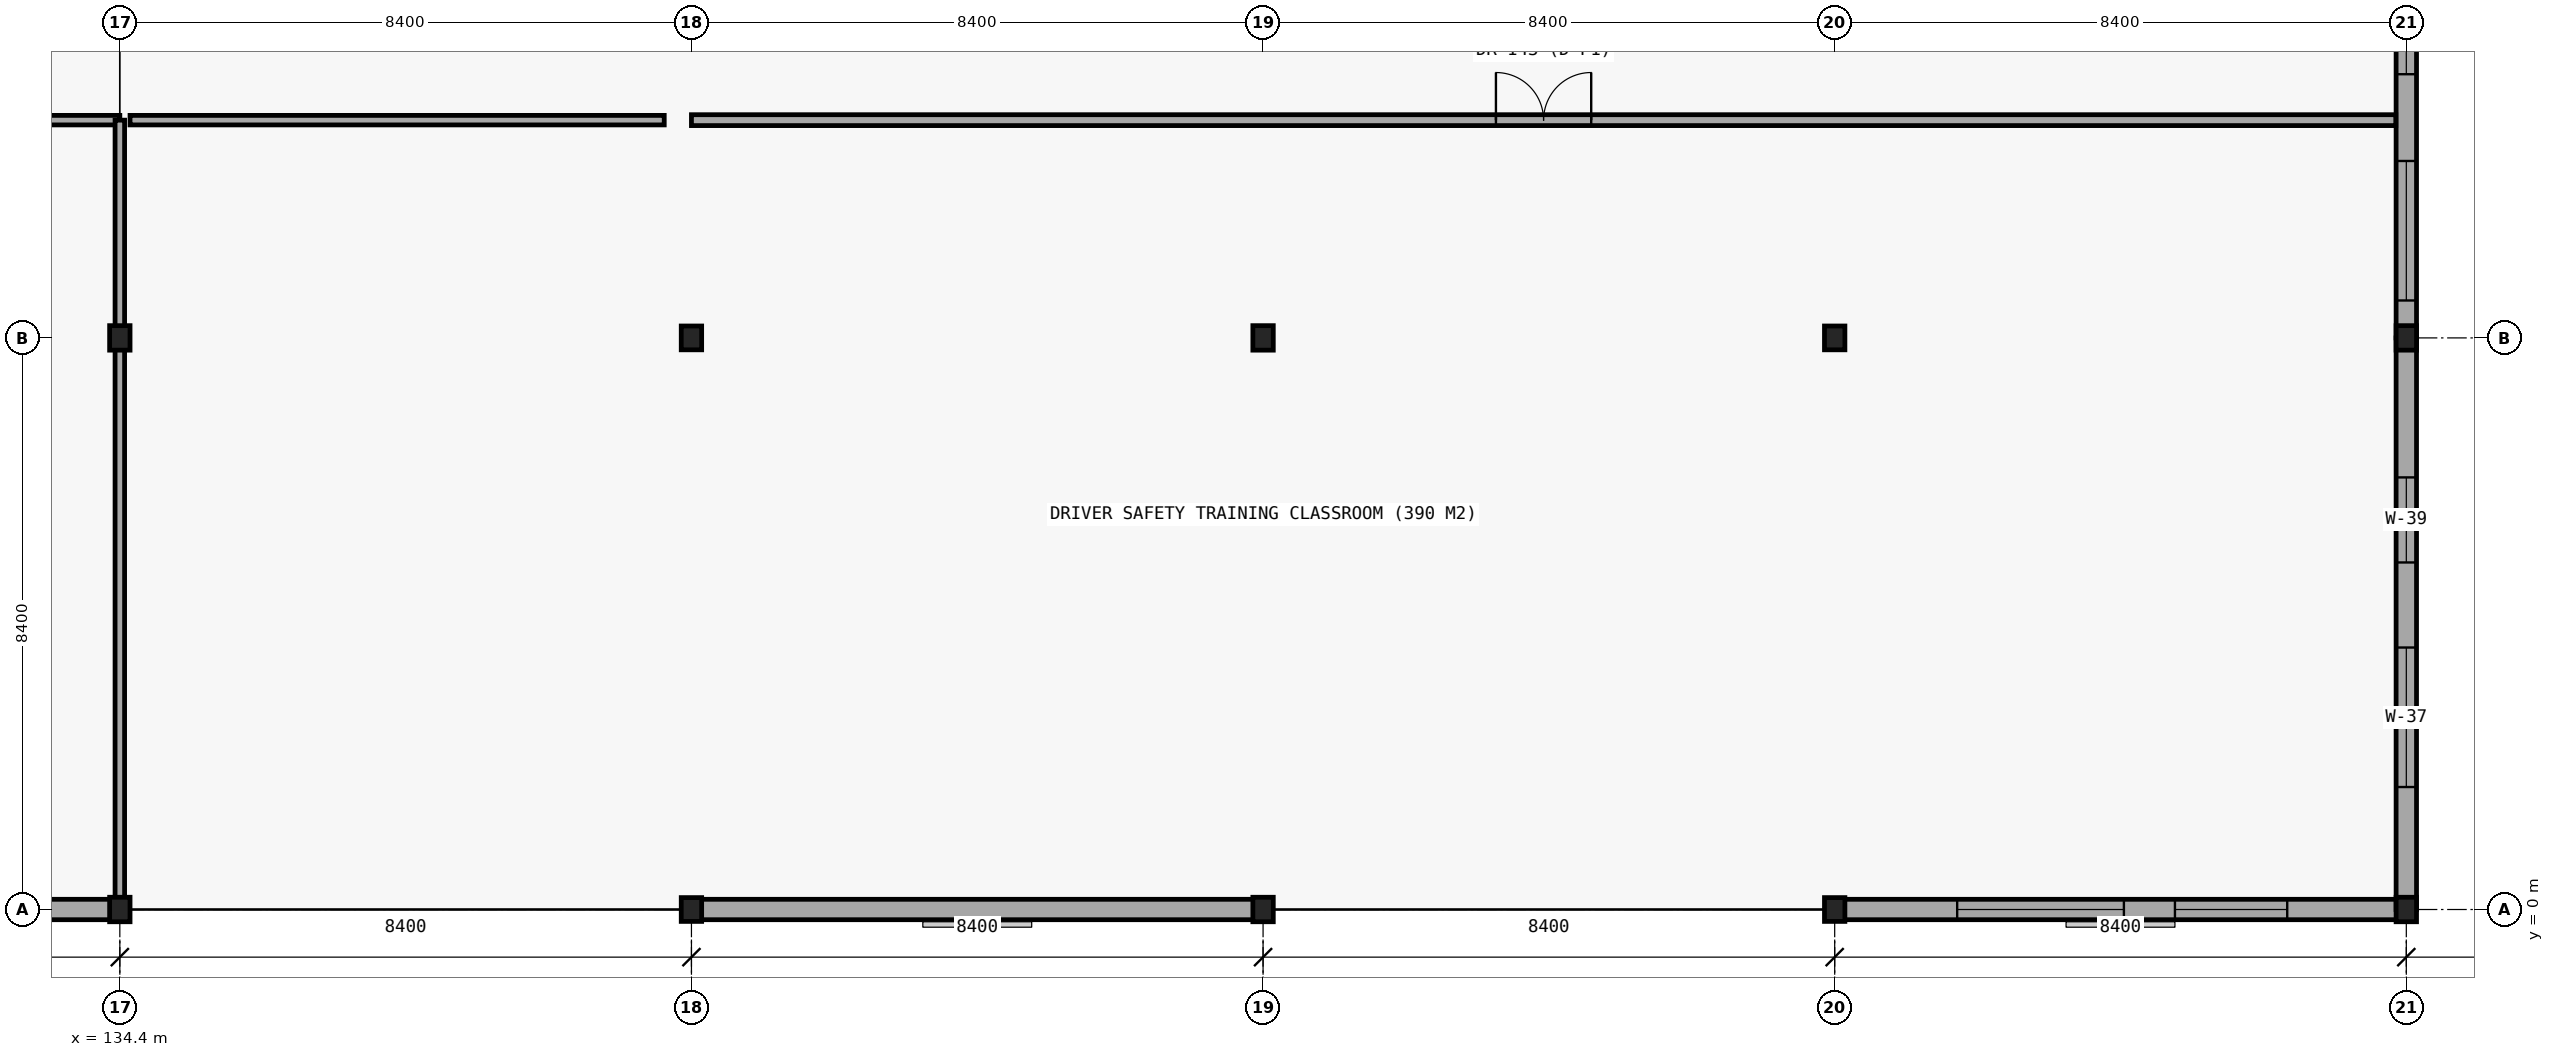
"""IFC4 building model, lengths in metres.
Left out: names, types, materials, properties, quantities, classifications, styles, units other than length and angle.
Written with IfcOpenShell. Run it as: python <this file> out.ifc"""

import sys

from ifc_helpers import new_model, si_unit, direction, frame, frame_2d, origin, origin_2d, place, context, subcontext, project, spatial, rectangle, i_section, extrude, element, fill, save


model = new_model("IFC4")
c1 = context("Model", 3, precision=1e-05, world=origin(), true_north=direction((0.0, 1.0)))
c2 = subcontext(c1, "Body", "Model", "MODEL_VIEW")
j1 = project(units=[si_unit("LENGTHUNIT", "METRE"), si_unit("PLANEANGLEUNIT", "RADIAN")], contexts=[c1])
p1 = place(None, origin())
s1 = spatial("IfcSite", under=j1, at=p1, CompositionType="ELEMENT")
p2 = place(p1, origin())
s2 = spatial("IfcBuilding", under=s1, at=p2, CompositionType="ELEMENT")
p3 = place(p2, frame((0.0, 0.0, 4.8)))
s3 = spatial("IfcBuildingStorey", under=s2, at=p3, CompositionType="ELEMENT", Elevation=4.8)
for number, where, z_axis, x_axis in (
    (1, (134.4, 0.0, 0.0), (0.0, 0.0, 1.0), (1.0, 0.0, 0.0)),
    (2, (134.4, 8.4, 0.0), (0.0, 0.0, 1.0), (1.0, 0.0, 0.0)),
):
    element("IfcColumn", number, at=place(p3, frame(where, z_axis=z_axis, x_axis=x_axis)), inside=s3, PredefinedType="COLUMN", context=c2, shape_type="SweptSolid", body=[
        extrude(i_section(OverallWidth=0.3, OverallDepth=0.36, WebThickness=0.012, FlangeThickness=0.022, FilletRadius=0.027, at=origin_2d()), origin(), (0.0, 0.0, 1.0), 4.2),
    ])
for number, where, z_axis, x_axis in (
    (3, (142.8, 0.0, 0.0), (0.0, 0.0, 1.0), (1.0, 0.0, 0.0)),
    (4, (142.8, 8.4, 0.0), (0.0, 0.0, 1.0), (1.0, 0.0, 0.0)),
):
    element("IfcColumn", number, at=place(p3, frame(where, z_axis=z_axis, x_axis=x_axis)), inside=s3, PredefinedType="COLUMN", context=c2, shape_type="SweptSolid", body=[
        extrude(i_section(OverallWidth=0.3, OverallDepth=0.35, WebThickness=0.01, FlangeThickness=0.018, FilletRadius=0.027, at=origin_2d()), origin(), (0.0, 0.0, 1.0), 4.2),
    ])
for number, where, z_axis, x_axis in (
    (5, (151.2, 0.0, 0.0), (0.0, 0.0, 1.0), (1.0, 0.0, 0.0)),
    (6, (151.2, 8.4, 0.0), (0.0, 0.0, 1.0), (1.0, 0.0, 0.0)),
):
    element("IfcColumn", number, at=place(p3, frame(where, z_axis=z_axis, x_axis=x_axis)), inside=s3, PredefinedType="COLUMN", context=c2, shape_type="SweptSolid", body=[
        extrude(i_section(OverallWidth=0.3, OverallDepth=0.36, WebThickness=0.012, FlangeThickness=0.022, FilletRadius=0.027, at=origin_2d()), origin(), (0.0, 0.0, 1.0), 4.2),
    ])
for number, where, z_axis, x_axis in (
    (7, (159.6, 0.0, 0.0), (0.0, 0.0, 1.0), (1.0, 0.0, 0.0)),
    (8, (159.6, 8.4, 0.0), (0.0, 0.0, 1.0), (1.0, 0.0, 0.0)),
):
    element("IfcColumn", number, at=place(p3, frame(where, z_axis=z_axis, x_axis=x_axis)), inside=s3, PredefinedType="COLUMN", context=c2, shape_type="SweptSolid", body=[
        extrude(i_section(OverallWidth=0.3, OverallDepth=0.35, WebThickness=0.01, FlangeThickness=0.018, FilletRadius=0.027, at=origin_2d()), origin(), (0.0, 0.0, 1.0), 4.2),
    ])
for number, where, z_axis, x_axis in (
    (9, (168.0, 0.0, 0.0), (0.0, 0.0, 1.0), (1.0, 0.0, 0.0)),
    (10, (168.0, 8.4, 0.0), (0.0, 0.0, 1.0), (1.0, 0.0, 0.0)),
):
    element("IfcColumn", number, at=place(p3, frame(where, z_axis=z_axis, x_axis=x_axis)), inside=s3, PredefinedType="COLUMN", context=c2, shape_type="SweptSolid", body=[
        extrude(i_section(OverallWidth=0.3, OverallDepth=0.36, WebThickness=0.012, FlangeThickness=0.022, FilletRadius=0.027, at=origin_2d()), origin(), (0.0, 0.0, 1.0), 4.2),
    ])
p4 = place(p3, frame((126.0, 0.0, 0.0), z_axis=(0.0, 0.0, 1.0), x_axis=(1.0, 0.0, 0.0)))
e11 = element("IfcWall", 11, at=p4, inside=s3, PredefinedType="STANDARD", context=c2, shape_type="SweptSolid", body=[
    extrude(rectangle(XDim=8.4, YDim=0.3, at=frame_2d((4.2, 0.0))), origin(), (0.0, 0.0, 1.0), 3.58),
])
p5 = place(p4, frame((1.8, 0.0, 1.05)))
e12 = element("IfcOpeningElement", 12, at=p5, cuts=e11, PredefinedType="OPENING", context=c2, shape_type="SweptSolid", body=[
    extrude(rectangle(XDim=2.45, YDim=1.85, at=frame_2d((1.225, 0.925))), frame((0.0, 0.16, 0.0), z_axis=(0.0, -1.0, 0.0), x_axis=(1.0, 0.0, 0.0)), (0.0, 0.0, 1.0), 0.32),
])
p6 = place(p4, frame((5.0, 0.0, 1.15)))
e13 = element("IfcOpeningElement", 13, at=p6, cuts=e11, PredefinedType="OPENING", context=c2, shape_type="SweptSolid", body=[
    extrude(rectangle(XDim=1.65, YDim=1.65, at=frame_2d((0.825, 0.825))), frame((0.0, 0.16, 0.0), z_axis=(0.0, -1.0, 0.0), x_axis=(1.0, 0.0, 0.0)), (0.0, 0.0, 1.0), 0.32),
])
p7 = place(p3, frame((142.8, 0.0, 0.0), z_axis=(0.0, 0.0, 1.0), x_axis=(1.0, 0.0, 0.0)))
e14 = element("IfcWall", 14, at=p7, inside=s3, PredefinedType="STANDARD", context=c2, shape_type="SweptSolid", body=[
    extrude(rectangle(XDim=8.4, YDim=0.3, at=frame_2d((4.2, 0.0))), origin(), (0.0, 0.0, 1.0), 3.58),
])
p8 = place(p3, frame((159.6, 0.0, 0.0), z_axis=(0.0, 0.0, 1.0), x_axis=(1.0, 0.0, 0.0)))
e15 = element("IfcWall", 15, at=p8, inside=s3, PredefinedType="STANDARD", context=c2, shape_type="SweptSolid", body=[
    extrude(rectangle(XDim=8.4, YDim=0.3, at=frame_2d((4.2, 0.0))), origin(), (0.0, 0.0, 1.0), 3.58),
])
p9 = place(p8, frame((1.8, 0.0, 1.05)))
e16 = element("IfcOpeningElement", 16, at=p9, cuts=e15, PredefinedType="OPENING", context=c2, shape_type="SweptSolid", body=[
    extrude(rectangle(XDim=2.45, YDim=1.85, at=frame_2d((1.225, 0.925))), frame((0.0, 0.16, 0.0), z_axis=(0.0, -1.0, 0.0), x_axis=(1.0, 0.0, 0.0)), (0.0, 0.0, 1.0), 0.32),
])
p10 = place(p8, frame((5.0, 0.0, 1.15)))
e17 = element("IfcOpeningElement", 17, at=p10, cuts=e15, PredefinedType="OPENING", context=c2, shape_type="SweptSolid", body=[
    extrude(rectangle(XDim=1.65, YDim=1.65, at=frame_2d((0.825, 0.825))), frame((0.0, 0.16, 0.0), z_axis=(0.0, -1.0, 0.0), x_axis=(1.0, 0.0, 0.0)), (0.0, 0.0, 1.0), 0.32),
])
p11 = place(p3, frame((168.0, 0.0, 0.0), z_axis=(0.0, 0.0, 1.0), x_axis=(0.0, 1.0, 0.0)))
e18 = element("IfcWall", 18, at=p11, inside=s3, PredefinedType="STANDARD", context=c2, shape_type="SweptSolid", body=[
    extrude(rectangle(XDim=8.4, YDim=0.3, at=frame_2d((4.2, 0.0))), origin(), (0.0, 0.0, 1.0), 3.58),
])
p12 = place(p11, frame((1.8, 0.0, 1.05)))
e19 = element("IfcOpeningElement", 19, at=p12, cuts=e18, PredefinedType="OPENING", context=c2, shape_type="SweptSolid", body=[
    extrude(rectangle(XDim=2.05, YDim=1.85, at=frame_2d((1.025, 0.925))), frame((0.0, 0.16, 0.0), z_axis=(0.0, -1.0, 0.0), x_axis=(1.0, 0.0, 0.0)), (0.0, 0.0, 1.0), 0.32),
])
p13 = place(p11, frame((5.1, 0.0, 1.2)))
e20 = element("IfcOpeningElement", 20, at=p13, cuts=e18, PredefinedType="OPENING", context=c2, shape_type="SweptSolid", body=[
    extrude(rectangle(XDim=1.25, YDim=1.55, at=frame_2d((0.625, 0.775))), frame((0.0, 0.16, 0.0), z_axis=(0.0, -1.0, 0.0), x_axis=(1.0, 0.0, 0.0)), (0.0, 0.0, 1.0), 0.32),
])
p14 = place(p3, frame((168.0, 8.4, 0.0), z_axis=(0.0, 0.0, 1.0), x_axis=(0.0, 1.0, 0.0)))
e21 = element("IfcWall", 21, at=p14, inside=s3, PredefinedType="STANDARD", context=c2, shape_type="SweptSolid", body=[
    extrude(rectangle(XDim=8.4, YDim=0.3, at=frame_2d((4.2, 0.0))), origin(), (0.0, 0.0, 1.0), 3.58),
])
p15 = place(p14, frame((0.55, 0.0, 1.05)))
e22 = element("IfcOpeningElement", 22, at=p15, cuts=e21, PredefinedType="OPENING", context=c2, shape_type="SweptSolid", body=[
    extrude(rectangle(XDim=2.05, YDim=1.85, at=frame_2d((1.025, 0.925))), frame((0.0, 0.16, 0.0), z_axis=(0.0, -1.0, 0.0), x_axis=(1.0, 0.0, 0.0)), (0.0, 0.0, 1.0), 0.32),
])
p16 = place(p14, frame((3.875, 0.0, 1.2)))
e23 = element("IfcOpeningElement", 23, at=p16, cuts=e21, PredefinedType="OPENING", context=c2, shape_type="SweptSolid", body=[
    extrude(rectangle(XDim=1.25, YDim=1.55, at=frame_2d((0.625, 0.775))), frame((0.0, 0.16, 0.0), z_axis=(0.0, -1.0, 0.0), x_axis=(1.0, 0.0, 0.0)), (0.0, 0.0, 1.0), 0.32),
])
p17 = place(p3, frame((126.15, 11.6, 0.0), z_axis=(0.0, 0.0, 1.0), x_axis=(1.0, 0.0, 0.0)))
e24 = element("IfcWall", 24, at=p17, inside=s3, PredefinedType="PARTITIONING", context=c2, shape_type="SweptSolid", body=[
    extrude(rectangle(XDim=8.25, YDim=0.14, at=frame_2d((4.125, 0.0))), origin(), (0.0, 0.0, 1.0), 3.5),
])
p18 = place(p3, frame((134.55, 11.6, 0.0), z_axis=(0.0, 0.0, 1.0), x_axis=(1.0, 0.0, 0.0)))
e25 = element("IfcWall", 25, at=p18, inside=s3, PredefinedType="PARTITIONING", context=c2, shape_type="SweptSolid", body=[
    extrude(rectangle(XDim=7.85, YDim=0.14, at=frame_2d((3.925, 0.0))), origin(), (0.0, 0.0, 1.0), 3.5),
])
p19 = place(p3, frame((142.8, 11.6, 0.0), z_axis=(0.0, 0.0, 1.0), x_axis=(1.0, 0.0, 0.0)))
e26 = element("IfcWall", 26, at=p19, inside=s3, PredefinedType="PARTITIONING", context=c2, shape_type="SweptSolid", body=[
    extrude(rectangle(XDim=25.045, YDim=0.16, at=frame_2d((12.522, 0.0))), origin(), (0.0, 0.0, 1.0), 3.5),
])
p20 = place(p19, frame((11.822, 0.0, 0.0)))
e27 = element("IfcOpeningElement", 27, at=p20, cuts=e26, PredefinedType="OPENING", context=c2, shape_type="SweptSolid", body=[
    extrude(rectangle(XDim=1.4, YDim=2.25, at=frame_2d((0.7, 1.125))), frame((0.0, 0.09, 0.0), z_axis=(0.0, -1.0, 0.0), x_axis=(1.0, 0.0, 0.0)), (0.0, 0.0, 1.0), 0.18),
])
p21 = place(p3, frame((134.4, 0.155, 0.0), z_axis=(0.0, 0.0, 1.0), x_axis=(0.0, 1.0, 0.0)))
e28 = element("IfcWall", 28, at=p21, inside=s3, PredefinedType="PARTITIONING", context=c2, shape_type="SweptSolid", body=[
    extrude(rectangle(XDim=11.445, YDim=0.14, at=frame_2d((5.723, 0.0))), origin(), (0.0, 0.0, 1.0), 3.45),
])
p22 = place(p9, origin())
e29 = element("IfcWindow", 29, at=p22, inside=s3, PartitioningType="SINGLE_PANEL", PredefinedType="WINDOW", context=c2, shape_type="SweptSolid", body=[
    extrude(rectangle(XDim=2.45, YDim=1.85, at=frame_2d((1.225, 0.925))), frame((0.0, 0.03, 0.0), z_axis=(0.0, -1.0, 0.0), x_axis=(1.0, 0.0, 0.0)), (0.0, 0.0, 1.0), 0.06),
])
fill(e16, e29)
p23 = place(p10, origin())
e30 = element("IfcWindow", 30, at=p23, inside=s3, PartitioningType="SINGLE_PANEL", PredefinedType="WINDOW", context=c2, shape_type="SweptSolid", body=[
    extrude(rectangle(XDim=1.65, YDim=1.65, at=frame_2d((0.825, 0.825))), frame((0.0, 0.03, 0.0), z_axis=(0.0, -1.0, 0.0), x_axis=(1.0, 0.0, 0.0)), (0.0, 0.0, 1.0), 0.06),
])
fill(e17, e30)
p24 = place(p12, origin())
e31 = element("IfcWindow", 31, at=p24, inside=s3, PartitioningType="SINGLE_PANEL", PredefinedType="WINDOW", context=c2, shape_type="SweptSolid", body=[
    extrude(rectangle(XDim=2.05, YDim=1.85, at=frame_2d((1.025, 0.925))), frame((0.0, 0.03, 0.0), z_axis=(0.0, -1.0, 0.0), x_axis=(1.0, 0.0, 0.0)), (0.0, 0.0, 1.0), 0.06),
])
fill(e19, e31)
p25 = place(p13, origin())
e32 = element("IfcWindow", 32, at=p25, inside=s3, PartitioningType="SINGLE_PANEL", PredefinedType="WINDOW", context=c2, shape_type="SweptSolid", body=[
    extrude(rectangle(XDim=1.25, YDim=1.55, at=frame_2d((0.625, 0.775))), frame((0.0, 0.03, 0.0), z_axis=(0.0, -1.0, 0.0), x_axis=(1.0, 0.0, 0.0)), (0.0, 0.0, 1.0), 0.06),
])
fill(e20, e32)
p26 = place(p15, origin())
e33 = element("IfcWindow", 33, at=p26, inside=s3, PartitioningType="SINGLE_PANEL", PredefinedType="WINDOW", context=c2, shape_type="SweptSolid", body=[
    extrude(rectangle(XDim=2.05, YDim=1.85, at=frame_2d((1.025, 0.925))), frame((0.0, 0.03, 0.0), z_axis=(0.0, -1.0, 0.0), x_axis=(1.0, 0.0, 0.0)), (0.0, 0.0, 1.0), 0.06),
])
fill(e22, e33)
p27 = place(p16, origin())
e34 = element("IfcWindow", 34, at=p27, inside=s3, PartitioningType="SINGLE_PANEL", PredefinedType="WINDOW", context=c2, shape_type="SweptSolid", body=[
    extrude(rectangle(XDim=1.25, YDim=1.55, at=frame_2d((0.625, 0.775))), frame((0.0, 0.03, 0.0), z_axis=(0.0, -1.0, 0.0), x_axis=(1.0, 0.0, 0.0)), (0.0, 0.0, 1.0), 0.06),
])
fill(e23, e34)
p28 = place(p20, origin())
e35 = element("IfcDoor", 35, at=p28, inside=s3, OperationType="DOUBLE_DOOR_SINGLE_SWING", PredefinedType="DOOR", context=c2, shape_type="SweptSolid", body=[
    extrude(rectangle(XDim=1.4, YDim=2.25, at=frame_2d((0.7, 1.125))), frame((0.0, 0.025, 0.0), z_axis=(0.0, -1.0, 0.0), x_axis=(1.0, 0.0, 0.0)), (0.0, 0.0, 1.0), 0.05),
])
fill(e27, e35)
save(model, sys.argv[1])
